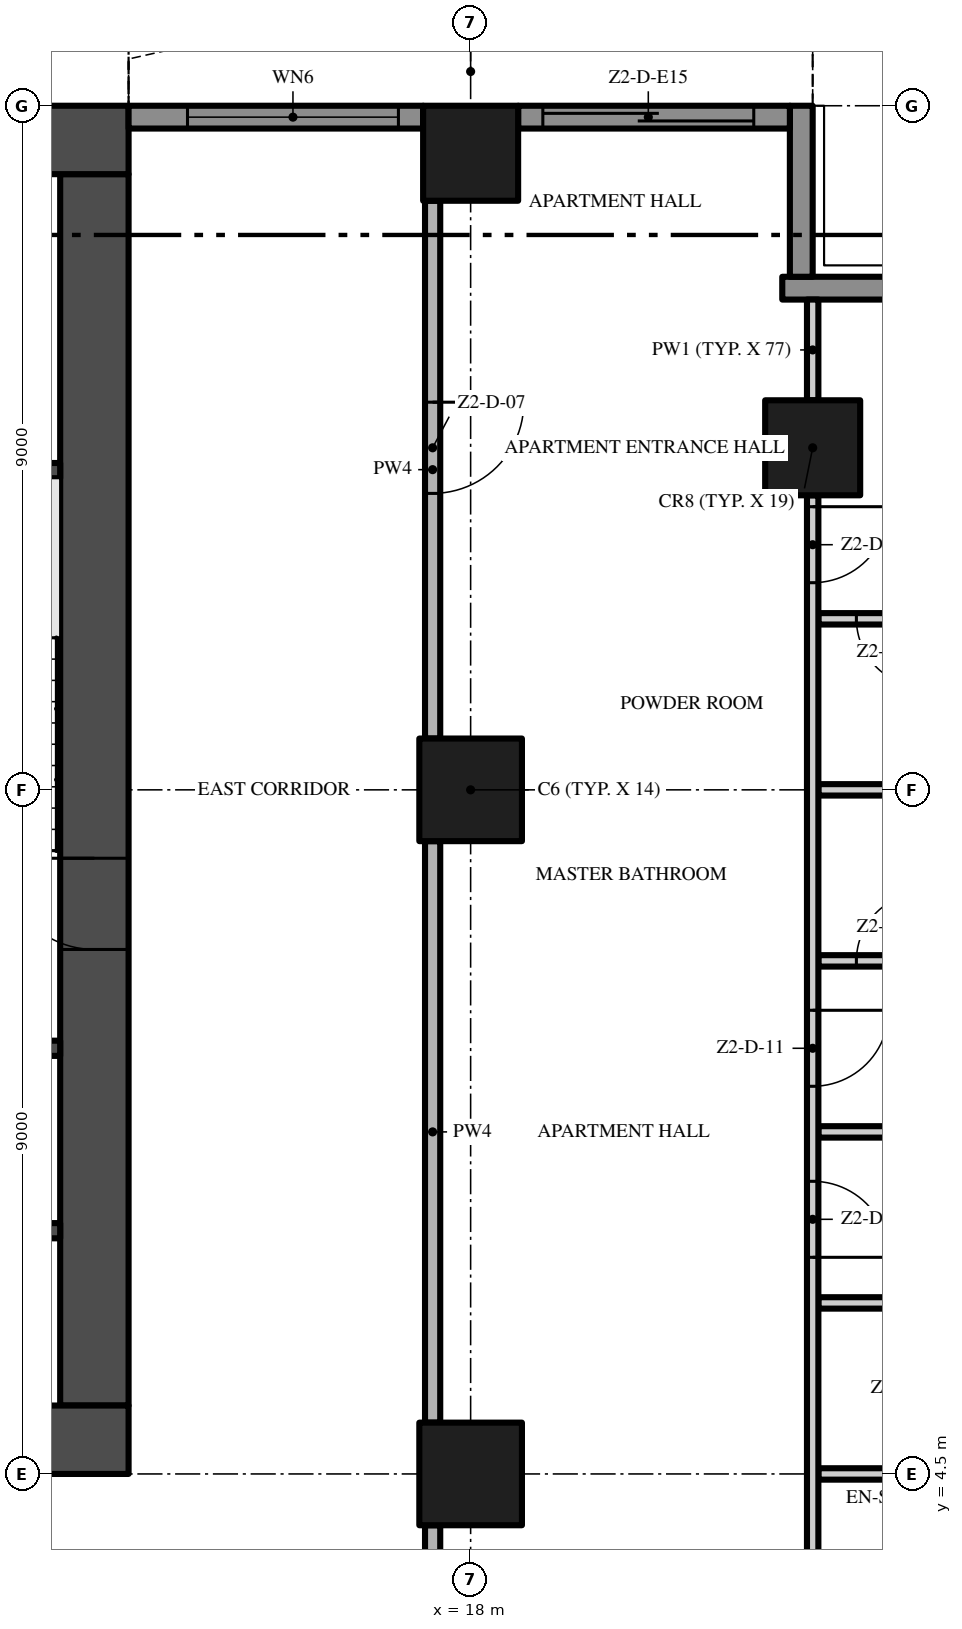
"""IFC4 building model, lengths in metres.
Left out: names, types, materials, properties, quantities, classifications, styles, units other than length and angle.
Written with IfcOpenShell. Run it as: python <this file> out.ifc"""

import sys

from ifc_helpers import new_model, si_unit, direction, frame, frame_2d, origin, origin_2d, place, context, subcontext, project, spatial, polyline, rectangle, outline, extrude, element, fill, save


model = new_model("IFC4")
c1 = context("Model", 3, precision=1e-05, world=origin(), true_north=direction((0.0, 1.0)))
c2 = subcontext(c1, "Body", "Model", "MODEL_VIEW")
j1 = project(units=[si_unit("LENGTHUNIT", "METRE"), si_unit("PLANEANGLEUNIT", "RADIAN")], contexts=[c1])
p1 = place(None, origin())
s1 = spatial("IfcSite", under=j1, at=p1, CompositionType="ELEMENT")
p2 = place(p1, origin())
s2 = spatial("IfcBuilding", under=s1, at=p2, CompositionType="ELEMENT")
p3 = place(p2, frame((0.0, 0.0, 111.2)))
s3 = spatial("IfcBuildingStorey", under=s2, at=p3, CompositionType="ELEMENT", Elevation=111.2)
p4 = place(p3, frame((-13.5, 4.95, -0.3), z_axis=(0.0, 0.0, 1.0), x_axis=(1.0, 0.0, 0.0)))
e1 = element("IfcWall", 1, at=p4, inside=s3, PredefinedType="SHEAR", context=c2, shape_type="SweptSolid", body=[
    extrude(rectangle(XDim=27.0, YDim=0.9, at=frame_2d((13.5, 0.0))), origin(), (0.0, 0.0, 1.0), 3.8),
])
p5 = place(p4, frame((12.0, 0.0, 0.3)))
e2 = element("IfcOpeningElement", 2, at=p5, cuts=e1, PredefinedType="OPENING", context=c2, shape_type="SweptSolid", body=[
    extrude(rectangle(XDim=3.0, YDim=2.4, at=frame_2d((1.5, 1.2))), frame((0.0, 0.46, 0.0), z_axis=(0.0, -1.0, 0.0), x_axis=(1.0, 0.0, 0.0)), (0.0, 0.0, 1.0), 0.92),
])
p6 = place(p4, frame((4.9, 0.0, 0.3)))
e3 = element("IfcOpeningElement", 3, at=p6, cuts=e1, PredefinedType="OPENING", context=c2, shape_type="SweptSolid", body=[
    extrude(rectangle(XDim=1.2, YDim=2.2, at=frame_2d((0.6, 1.1))), frame((0.0, 0.46, 0.0), z_axis=(0.0, -1.0, 0.0), x_axis=(1.0, 0.0, 0.0)), (0.0, 0.0, 1.0), 0.92),
])
p7 = place(p4, frame((20.75, 0.0, 0.3)))
e4 = element("IfcOpeningElement", 4, at=p7, cuts=e1, PredefinedType="OPENING", context=c2, shape_type="SweptSolid", body=[
    extrude(rectangle(XDim=1.5, YDim=2.2, at=frame_2d((0.75, 1.1))), frame((0.0, 0.46, 0.0), z_axis=(0.0, -1.0, 0.0), x_axis=(1.0, 0.0, 0.0)), (0.0, 0.0, 1.0), 0.92),
])
p8 = place(p4, frame((17.4, 0.0, 0.3)))
e5 = element("IfcOpeningElement", 5, at=p8, cuts=e1, PredefinedType="OPENING", context=c2, shape_type="SweptSolid", body=[
    extrude(rectangle(XDim=1.2, YDim=2.2, at=frame_2d((0.6, 1.1))), frame((0.0, 0.46, 0.0), z_axis=(0.0, -1.0, 0.0), x_axis=(1.0, 0.0, 0.0)), (0.0, 0.0, 1.0), 0.92),
])
p9 = place(p3, frame((13.05, 5.4, -0.3), z_axis=(0.0, 0.0, 1.0), x_axis=(0.0, 1.0, 0.0)))
e6 = element("IfcWall", 6, at=p9, inside=s3, PredefinedType="SHEAR", context=c2, shape_type="SweptSolid", body=[
    extrude(rectangle(XDim=16.2, YDim=0.9, at=frame_2d((8.1, 0.0))), origin(), (0.0, 0.0, 1.0), 3.8),
])
p10 = place(p9, frame((6.0, 0.0, 0.3)))
e7 = element("IfcOpeningElement", 7, at=p10, cuts=e6, PredefinedType="OPENING", context=c2, shape_type="SweptSolid", body=[
    extrude(rectangle(XDim=1.2, YDim=2.2, at=frame_2d((0.6, 1.1))), frame((0.0, 0.46, 0.0), z_axis=(0.0, -1.0, 0.0), x_axis=(1.0, 0.0, 0.0)), (0.0, 0.0, 1.0), 0.92),
])
p11 = place(p3, frame((13.5, 22.05, -0.3), z_axis=(0.0, 0.0, 1.0), x_axis=(-1.0, 0.0, 0.0)))
e8 = element("IfcWall", 8, at=p11, inside=s3, PredefinedType="SHEAR", context=c2, shape_type="SweptSolid", body=[
    extrude(rectangle(XDim=27.0, YDim=0.9, at=frame_2d((13.5, 0.0))), origin(), (0.0, 0.0, 1.0), 3.8),
])
p12 = place(p3, frame((18.0, 13.5, 0.0), z_axis=(0.0, 0.0, 1.0), x_axis=(1.0, 0.0, 0.0)))
e9 = element("IfcColumn", 9, at=p12, inside=s3, PredefinedType="COLUMN", context=c2, shape_type="SweptSolid", body=[
    extrude(rectangle(XDim=1.35, YDim=1.35, at=origin_2d()), origin(), (0.0, 0.0, 1.0), 3.5),
])
p13 = place(p3, frame((18.0, 21.875, 0.0), z_axis=(0.0, 0.0, 1.0), x_axis=(1.0, 0.0, 0.0)))
e10 = element("IfcColumn", 10, at=p13, inside=s3, PredefinedType="COLUMN", context=c2, shape_type="SweptSolid", body=[
    extrude(rectangle(XDim=1.25, YDim=1.25, at=origin_2d()), origin(), (0.0, 0.0, 1.0), 3.5),
])
p14 = place(p3, frame((18.0, 4.5, 0.0), z_axis=(0.0, 0.0, 1.0), x_axis=(1.0, 0.0, 0.0)))
e11 = element("IfcColumn", 11, at=p14, inside=s3, PredefinedType="COLUMN", context=c2, shape_type="SweptSolid", body=[
    extrude(rectangle(XDim=1.35, YDim=1.35, at=origin_2d()), origin(), (0.0, 0.0, 1.0), 3.5),
])
p15 = place(p3, frame((22.5, 18.0, 0.0), z_axis=(0.0, 0.0, 1.0), x_axis=(1.0, 0.0, 0.0)))
e12 = element("IfcColumn", 12, at=p15, inside=s3, PredefinedType="COLUMN", context=c2, shape_type="SweptSolid", body=[
    extrude(rectangle(XDim=1.25, YDim=1.25, at=origin_2d()), origin(), (0.0, 0.0, 1.0), 3.5),
])
p16 = place(p3, frame((22.1, 20.1, 0.0), z_axis=(0.0, 0.0, 1.0), x_axis=(1.0, 0.0, 0.0)))
e13 = element("IfcWall", 13, at=p16, inside=s3, PredefinedType="SOLIDWALL", context=c2, shape_type="SweptSolid", body=[
    extrude(rectangle(XDim=2.35, YDim=0.3, at=frame_2d((1.175, 0.0))), origin(), (0.0, 0.0, 1.0), 3.5),
])
p17 = place(p3, frame((22.35, 22.5, 0.0), z_axis=(0.0, 0.0, 1.0), x_axis=(0.0, -1.0, 0.0)))
e14 = element("IfcWall", 14, at=p17, inside=s3, PredefinedType="SOLIDWALL", context=c2, shape_type="SweptSolid", body=[
    extrude(rectangle(XDim=2.25, YDim=0.3, at=frame_2d((1.125, 0.0))), origin(), (0.0, 0.0, 1.0), 3.5),
])
p18 = place(p3, frame((18.625, 22.35, 0.0), z_axis=(0.0, 0.0, 1.0), x_axis=(1.0, 0.0, 0.0)))
e15 = element("IfcWall", 15, at=p18, inside=s3, PredefinedType="SOLIDWALL", context=c2, shape_type="SweptSolid", body=[
    extrude(rectangle(XDim=3.575, YDim=0.3, at=frame_2d((1.788, 0.0))), origin(), (0.0, 0.0, 1.0), 3.5),
])
p19 = place(p18, frame((0.325, 0.0, 0.0)))
e16 = element("IfcOpeningElement", 16, at=p19, cuts=e15, PredefinedType="OPENING", context=c2, shape_type="SweptSolid", body=[
    extrude(rectangle(XDim=2.775, YDim=2.4, at=frame_2d((1.387, 1.2))), frame((0.0, 0.16, 0.0), z_axis=(0.0, -1.0, 0.0), x_axis=(1.0, 0.0, 0.0)), (0.0, 0.0, 1.0), 0.32),
])
p20 = place(p3, frame((13.5, 22.35, 0.0), z_axis=(0.0, 0.0, 1.0), x_axis=(1.0, 0.0, 0.0)))
e17 = element("IfcWall", 17, at=p20, inside=s3, PredefinedType="SOLIDWALL", context=c2, shape_type="SweptSolid", body=[
    extrude(rectangle(XDim=3.875, YDim=0.3, at=frame_2d((1.938, 0.0))), origin(), (0.0, 0.0, 1.0), 3.5),
])
p21 = place(p20, frame((0.775, 0.0, 0.45)))
e18 = element("IfcOpeningElement", 18, at=p21, cuts=e17, PredefinedType="OPENING", context=c2, shape_type="SweptSolid", body=[
    extrude(rectangle(XDim=2.775, YDim=2.65, at=frame_2d((1.387, 1.325))), frame((0.0, 0.16, 0.0), z_axis=(0.0, -1.0, 0.0), x_axis=(1.0, 0.0, 0.0)), (0.0, 0.0, 1.0), 0.32),
])
p22 = place(p3, origin())
e19 = element("IfcWall", 19, at=p22, inside=s3, PredefinedType="USERDEFINED", context=c2, shape_type="SweptSolid", body=[
    extrude(outline(polyline([(22.5, 25.149), (21.0, 25.485), (20.625, 25.5), (19.5, 25.369), (18.0, 24.845), (16.5, 24.112), (15.0, 23.451), (13.5, 23.115), (13.555, 22.871), (15.079, 23.213), (16.605, 23.885), (18.096, 24.614), (19.556, 25.124), (20.635, 25.249), (20.967, 25.236), (22.445, 24.905), (22.5, 25.149)])), origin(), (0.0, 0.0, 1.0), 0.9),
])
for number, where, z_axis, x_axis in (
    (20, (9.65, 7.7, 0.0), (0.0, 0.0, 1.0), (1.0, 0.0, 0.0)),
    (21, (9.65, 10.1, 0.0), (0.0, 0.0, 1.0), (1.0, 0.0, 0.0)),
    (22, (9.65, 17.7, 0.0), (0.0, 0.0, 1.0), (1.0, 0.0, 0.0)),
):
    element("IfcWall", number, at=place(p3, frame(where, z_axis=z_axis, x_axis=x_axis)), inside=s3, PredefinedType="SHEAR", context=c2, shape_type="SweptSolid", body=[
        extrude(rectangle(XDim=2.95, YDim=0.2, at=frame_2d((1.475, 0.0))), origin(), (0.0, 0.0, 1.0), 3.5),
    ])
p23 = place(p3, frame((22.575, 4.5, 0.0), z_axis=(0.0, 0.0, 1.0), x_axis=(1.0, 0.0, 0.0)))
e23 = element("IfcWall", 23, at=p23, inside=s3, PredefinedType="PARTITIONING", context=c2, shape_type="SweptSolid", body=[
    extrude(rectangle(XDim=3.175, YDim=0.15, at=frame_2d((1.587, 0.0))), origin(), (0.0, 0.0, 1.0), 3.5),
])
p24 = place(p3, frame((22.575, 6.75, 0.0), z_axis=(0.0, 0.0, 1.0), x_axis=(1.0, 0.0, 0.0)))
e24 = element("IfcWall", 24, at=p24, inside=s3, PredefinedType="PARTITIONING", context=c2, shape_type="SweptSolid", body=[
    extrude(rectangle(XDim=1.875, YDim=0.15, at=frame_2d((0.938, 0.0))), origin(), (0.0, 0.0, 1.0), 3.5),
])
p25 = place(p3, frame((22.575, 9.0, 0.0), z_axis=(0.0, 0.0, 1.0), x_axis=(1.0, 0.0, 0.0)))
e25 = element("IfcWall", 25, at=p25, inside=s3, PredefinedType="PARTITIONING", context=c2, shape_type="SweptSolid", body=[
    extrude(rectangle(XDim=4.125, YDim=0.15, at=frame_2d((2.062, 0.0))), origin(), (0.0, 0.0, 1.0), 3.5),
])
p26 = place(p3, frame((22.575, 11.25, 0.0), z_axis=(0.0, 0.0, 1.0), x_axis=(1.0, 0.0, 0.0)))
e26 = element("IfcWall", 26, at=p26, inside=s3, PredefinedType="PARTITIONING", context=c2, shape_type="SweptSolid", body=[
    extrude(rectangle(XDim=1.875, YDim=0.15, at=frame_2d((0.938, 0.0))), origin(), (0.0, 0.0, 1.0), 3.5),
])
p27 = place(p26, frame((0.5, 0.0, 0.0)))
e27 = element("IfcOpeningElement", 27, at=p27, cuts=e26, PredefinedType="OPENING", context=c2, shape_type="SweptSolid", body=[
    extrude(rectangle(XDim=0.9, YDim=2.1, at=frame_2d((0.45, 1.05))), frame((0.0, 0.085, 0.0), z_axis=(0.0, -1.0, 0.0), x_axis=(1.0, 0.0, 0.0)), (0.0, 0.0, 1.0), 0.17),
])
p28 = place(p3, frame((22.575, 13.5, 0.0), z_axis=(0.0, 0.0, 1.0), x_axis=(1.0, 0.0, 0.0)))
e28 = element("IfcWall", 28, at=p28, inside=s3, PredefinedType="PARTITIONING", context=c2, shape_type="SweptSolid", body=[
    extrude(rectangle(XDim=1.875, YDim=0.15, at=frame_2d((0.938, 0.0))), origin(), (0.0, 0.0, 1.0), 3.5),
])
p29 = place(p3, frame((24.45, 15.75, 0.0), z_axis=(0.0, 0.0, 1.0), x_axis=(-1.0, 0.0, 0.0)))
e29 = element("IfcWall", 29, at=p29, inside=s3, PredefinedType="PARTITIONING", context=c2, shape_type="SweptSolid", body=[
    extrude(rectangle(XDim=1.875, YDim=0.15, at=frame_2d((0.938, 0.0))), origin(), (0.0, 0.0, 1.0), 3.5),
])
p30 = place(p29, frame((0.475, 0.0, 0.0)))
e30 = element("IfcOpeningElement", 30, at=p30, cuts=e29, PredefinedType="OPENING", context=c2, shape_type="SweptSolid", body=[
    extrude(rectangle(XDim=0.9, YDim=2.1, at=frame_2d((0.45, 1.05))), frame((0.0, 0.085, 0.0), z_axis=(0.0, -1.0, 0.0), x_axis=(1.0, 0.0, 0.0)), (0.0, 0.0, 1.0), 0.17),
])
p31 = place(p3, frame((17.5, -0.2, 0.0), z_axis=(0.0, 0.0, 1.0), x_axis=(0.0, 1.0, 0.0)))
e31 = element("IfcWall", 31, at=p31, inside=s3, PredefinedType="PARTITIONING", context=c2, shape_type="SweptSolid", body=[
    extrude(rectangle(XDim=4.025, YDim=0.2, at=frame_2d((2.013, 0.0))), origin(), (0.0, 0.0, 1.0), 3.5),
])
p32 = place(p3, frame((17.5, 5.175, 0.0), z_axis=(0.0, 0.0, 1.0), x_axis=(0.0, 1.0, 0.0)))
e32 = element("IfcWall", 32, at=p32, inside=s3, PredefinedType="PARTITIONING", context=c2, shape_type="SweptSolid", body=[
    extrude(rectangle(XDim=7.65, YDim=0.2, at=frame_2d((3.825, 0.0))), origin(), (0.0, 0.0, 1.0), 3.5),
])
p33 = place(p3, frame((17.5, 21.25, 0.0), z_axis=(0.0, 0.0, 1.0), x_axis=(0.0, -1.0, 0.0)))
e33 = element("IfcWall", 33, at=p33, inside=s3, PredefinedType="PARTITIONING", context=c2, shape_type="SweptSolid", body=[
    extrude(rectangle(XDim=7.075, YDim=0.2, at=frame_2d((3.538, 0.0))), origin(), (0.0, 0.0, 1.0), 3.5),
])
p34 = place(p33, frame((2.65, 0.0, 0.0)))
e34 = element("IfcOpeningElement", 34, at=p34, cuts=e33, PredefinedType="OPENING", context=c2, shape_type="SweptSolid", body=[
    extrude(rectangle(XDim=1.2, YDim=2.4, at=frame_2d((0.6, 1.2))), frame((0.0, 0.11, 0.0), z_axis=(0.0, -1.0, 0.0), x_axis=(1.0, 0.0, 0.0)), (0.0, 0.0, 1.0), 0.22),
])
p35 = place(p3, frame((22.5, 17.375, 0.0), z_axis=(0.0, 0.0, 1.0), x_axis=(0.0, -1.0, 0.0)))
e35 = element("IfcWall", 35, at=p35, inside=s3, PredefinedType="PARTITIONING", context=c2, shape_type="SweptSolid", body=[
    extrude(rectangle(XDim=17.275, YDim=0.15, at=frame_2d((8.637, 0.0))), origin(), (0.0, 0.0, 1.0), 3.5),
])
p36 = place(p35, frame((14.625, 0.0, 0.0)))
e36 = element("IfcOpeningElement", 36, at=p36, cuts=e35, PredefinedType="OPENING", context=c2, shape_type="SweptSolid", body=[
    extrude(rectangle(XDim=1.0, YDim=2.4, at=frame_2d((0.5, 1.2))), frame((0.0, 0.085, 0.0), z_axis=(0.0, -1.0, 0.0), x_axis=(1.0, 0.0, 0.0)), (0.0, 0.0, 1.0), 0.17),
])
p37 = place(p35, frame((9.025, 0.0, 0.0)))
e37 = element("IfcOpeningElement", 37, at=p37, cuts=e35, PredefinedType="OPENING", context=c2, shape_type="SweptSolid", body=[
    extrude(rectangle(XDim=1.0, YDim=2.4, at=frame_2d((0.5, 1.2))), frame((0.0, 0.085, 0.0), z_axis=(0.0, -1.0, 0.0), x_axis=(1.0, 0.0, 0.0)), (0.0, 0.0, 1.0), 0.17),
])
p38 = place(p35, frame((6.775, 0.0, 0.0)))
e38 = element("IfcOpeningElement", 38, at=p38, cuts=e35, PredefinedType="OPENING", context=c2, shape_type="SweptSolid", body=[
    extrude(rectangle(XDim=1.0, YDim=2.4, at=frame_2d((0.5, 1.2))), frame((0.0, 0.085, 0.0), z_axis=(0.0, -1.0, 0.0), x_axis=(1.0, 0.0, 0.0)), (0.0, 0.0, 1.0), 0.17),
])
p39 = place(p35, frame((0.15, 0.0, 0.0)))
e39 = element("IfcOpeningElement", 39, at=p39, cuts=e35, PredefinedType="OPENING", context=c2, shape_type="SweptSolid", body=[
    extrude(rectangle(XDim=1.0, YDim=2.4, at=frame_2d((0.5, 1.2))), frame((0.0, 0.085, 0.0), z_axis=(0.0, -1.0, 0.0), x_axis=(1.0, 0.0, 0.0)), (0.0, 0.0, 1.0), 0.17),
])
p40 = place(p3, frame((22.5, 18.625, 0.0), z_axis=(0.0, 0.0, 1.0), x_axis=(0.0, 1.0, 0.0)))
e40 = element("IfcWall", 40, at=p40, inside=s3, PredefinedType="PARTITIONING", context=c2, shape_type="SweptSolid", body=[
    extrude(rectangle(XDim=1.325, YDim=0.15, at=frame_2d((0.662, 0.0))), origin(), (0.0, 0.0, 1.0), 3.5),
])
p41 = place(p19, origin())
e41 = element("IfcDoor", 41, at=p41, inside=s3, OperationType="SINGLE_SWING_LEFT", PredefinedType="DOOR", context=c2, shape_type="SweptSolid", body=[
    extrude(rectangle(XDim=2.775, YDim=2.4, at=frame_2d((1.387, 1.2))), frame((0.0, 0.025, 0.0), z_axis=(0.0, -1.0, 0.0), x_axis=(1.0, 0.0, 0.0)), (0.0, 0.0, 1.0), 0.05),
])
fill(e16, e41)
p42 = place(p21, origin())
e42 = element("IfcWindow", 42, at=p42, inside=s3, PartitioningType="SINGLE_PANEL", PredefinedType="WINDOW", context=c2, shape_type="SweptSolid", body=[
    extrude(rectangle(XDim=2.775, YDim=2.65, at=frame_2d((1.387, 1.325))), frame((0.0, 0.03, 0.0), z_axis=(0.0, -1.0, 0.0), x_axis=(1.0, 0.0, 0.0)), (0.0, 0.0, 1.0), 0.06),
])
fill(e18, e42)
p43 = place(p10, frame((1.2, 0.0, 0.0), z_axis=(0.0, 0.0, 1.0), x_axis=(-1.0, 0.0, 0.0)))
e43 = element("IfcDoor", 43, at=p43, inside=s3, OperationType="SINGLE_SWING_LEFT", PredefinedType="DOOR", context=c2, shape_type="SweptSolid", body=[
    extrude(rectangle(XDim=1.2, YDim=2.2, at=frame_2d((0.6, 1.1))), frame((0.0, 0.025, 0.0), z_axis=(0.0, -1.0, 0.0), x_axis=(1.0, 0.0, 0.0)), (0.0, 0.0, 1.0), 0.05),
])
fill(e7, e43)
p44 = place(p34, origin())
e44 = element("IfcDoor", 44, at=p44, inside=s3, OperationType="SINGLE_SWING_LEFT", PredefinedType="DOOR", context=c2, shape_type="SweptSolid", body=[
    extrude(rectangle(XDim=1.2, YDim=2.4, at=frame_2d((0.6, 1.2))), frame((0.0, 0.025, 0.0), z_axis=(0.0, -1.0, 0.0), x_axis=(1.0, 0.0, 0.0)), (0.0, 0.0, 1.0), 0.05),
])
fill(e34, e44)
p45 = place(p37, origin())
e45 = element("IfcDoor", 45, at=p45, inside=s3, OperationType="SINGLE_SWING_RIGHT", PredefinedType="DOOR", context=c2, shape_type="SweptSolid", body=[
    extrude(rectangle(XDim=1.0, YDim=2.4, at=frame_2d((0.5, 1.2))), frame((0.0, 0.025, 0.0), z_axis=(0.0, -1.0, 0.0), x_axis=(1.0, 0.0, 0.0)), (0.0, 0.0, 1.0), 0.05),
])
fill(e37, e45)
p46 = place(p38, origin())
e46 = element("IfcDoor", 46, at=p46, inside=s3, OperationType="SINGLE_SWING_LEFT", PredefinedType="DOOR", context=c2, shape_type="SweptSolid", body=[
    extrude(rectangle(XDim=1.0, YDim=2.4, at=frame_2d((0.5, 1.2))), frame((0.0, 0.025, 0.0), z_axis=(0.0, -1.0, 0.0), x_axis=(1.0, 0.0, 0.0)), (0.0, 0.0, 1.0), 0.05),
])
fill(e38, e46)
p47 = place(p27, origin())
e47 = element("IfcDoor", 47, at=p47, inside=s3, OperationType="SINGLE_SWING_RIGHT", PredefinedType="DOOR", context=c2, shape_type="SweptSolid", body=[
    extrude(rectangle(XDim=0.9, YDim=2.1, at=frame_2d((0.45, 1.05))), frame((0.0, 0.025, 0.0), z_axis=(0.0, -1.0, 0.0), x_axis=(1.0, 0.0, 0.0)), (0.0, 0.0, 1.0), 0.05),
])
fill(e27, e47)
p48 = place(p39, origin())
e48 = element("IfcDoor", 48, at=p48, inside=s3, OperationType="SINGLE_SWING_LEFT", PredefinedType="DOOR", context=c2, shape_type="SweptSolid", body=[
    extrude(rectangle(XDim=1.0, YDim=2.4, at=frame_2d((0.5, 1.2))), frame((0.0, 0.025, 0.0), z_axis=(0.0, -1.0, 0.0), x_axis=(1.0, 0.0, 0.0)), (0.0, 0.0, 1.0), 0.05),
])
fill(e39, e48)
p49 = place(p30, origin())
e49 = element("IfcDoor", 49, at=p49, inside=s3, OperationType="SINGLE_SWING_LEFT", PredefinedType="DOOR", context=c2, shape_type="SweptSolid", body=[
    extrude(rectangle(XDim=0.9, YDim=2.1, at=frame_2d((0.45, 1.05))), frame((0.0, 0.025, 0.0), z_axis=(0.0, -1.0, 0.0), x_axis=(1.0, 0.0, 0.0)), (0.0, 0.0, 1.0), 0.05),
])
fill(e30, e49)
save(model, sys.argv[1])
